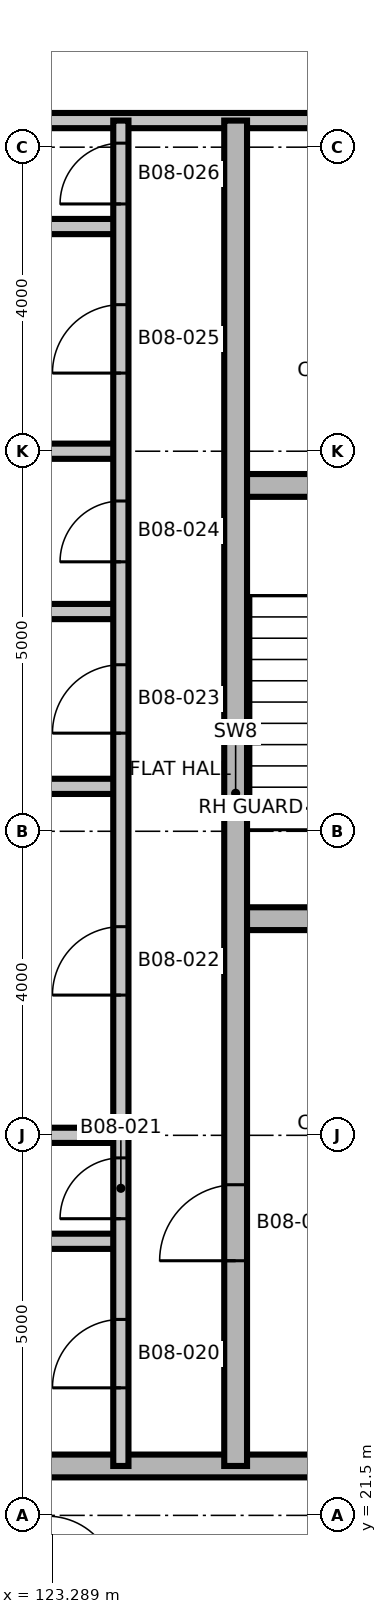
"""IFC4 building model, lengths in metres.
Left out: names, types, materials, properties, quantities, classifications, styles, units other than length and angle.
Written with IfcOpenShell. Run it as: python <this file> out.ifc"""

import sys

from ifc_helpers import new_model, si_unit, direction, frame, frame_2d, origin, place, context, subcontext, project, spatial, rectangle, extrude, element, fill, save


model = new_model("IFC4")
c1 = context("Model", 3, precision=1e-05, world=origin(), true_north=direction((0.0, 1.0)))
c2 = subcontext(c1, "Body", "Model", "MODEL_VIEW")
j1 = project(units=[si_unit("LENGTHUNIT", "METRE"), si_unit("PLANEANGLEUNIT", "RADIAN")], contexts=[c1])
p1 = place(None, origin())
s1 = spatial("IfcSite", under=j1, at=p1, CompositionType="ELEMENT")
p2 = place(p1, origin())
s2 = spatial("IfcBuilding", under=s1, at=p2, CompositionType="ELEMENT")
p3 = place(p2, frame((0.0, 0.0, 94.5)))
s3 = spatial("IfcBuildingStorey", under=s2, at=p3, CompositionType="ELEMENT", Elevation=94.5)
p4 = place(p3, frame((120.56, 22.15, 0.0), z_axis=(0.0, 0.0, 1.0), x_axis=(1.0, 0.0, 0.0)))
e1 = element("IfcWall", 1, at=p4, inside=s3, PredefinedType="SHEAR", context=c2, shape_type="SweptSolid", body=[
    extrude(rectangle(XDim=24.38, YDim=0.3, at=frame_2d((12.19, 0.0))), origin(), (0.0, 0.0, 1.0), 3.4),
])
p5 = place(p4, frame((22.19, 0.0, 0.0)))
e2 = element("IfcOpeningElement", 2, at=p5, cuts=e1, PredefinedType="OPENING", context=c2, shape_type="SweptSolid", body=[
    extrude(rectangle(XDim=1.0, YDim=2.1, at=frame_2d((0.5, 1.05))), frame((0.0, 0.16, 0.0), z_axis=(0.0, -1.0, 0.0), x_axis=(1.0, 0.0, 0.0)), (0.0, 0.0, 1.0), 0.32),
])
p6 = place(p4, frame((10.54, 0.0, 0.0)))
e3 = element("IfcOpeningElement", 3, at=p6, cuts=e1, PredefinedType="OPENING", context=c2, shape_type="SweptSolid", body=[
    extrude(rectangle(XDim=1.0, YDim=2.1, at=frame_2d((0.5, 1.05))), frame((0.0, 0.16, 0.0), z_axis=(0.0, -1.0, 0.0), x_axis=(1.0, 0.0, 0.0)), (0.0, 0.0, 1.0), 0.32),
])
p7 = place(p4, frame((16.19, 0.0, 0.0)))
e4 = element("IfcOpeningElement", 4, at=p7, cuts=e1, PredefinedType="OPENING", context=c2, shape_type="SweptSolid", body=[
    extrude(rectangle(XDim=0.9, YDim=2.1, at=frame_2d((0.45, 1.05))), frame((0.0, 0.16, 0.0), z_axis=(0.0, -1.0, 0.0), x_axis=(1.0, 0.0, 0.0)), (0.0, 0.0, 1.0), 0.32),
])
for number, where, z_axis, x_axis in (
    (5, (120.56, 25.106, 0.0), (0.0, 0.0, 1.0), (1.0, 0.0, 0.0)),
    (6, (120.56, 26.5, 0.0), (0.0, 0.0, 1.0), (1.0, 0.0, 0.0)),
):
    element("IfcWall", number, at=place(p3, frame(where, z_axis=z_axis, x_axis=x_axis)), inside=s3, PredefinedType="PARTITIONING", context=c2, shape_type="SweptSolid", body=[
        extrude(rectangle(XDim=3.63, YDim=0.2, at=frame_2d((1.815, 0.0))), origin(), (0.0, 0.0, 1.0), 3.4),
    ])
p8 = place(p3, frame((125.7, 29.35, 0.0), z_axis=(0.0, 0.0, 1.0), x_axis=(1.0, 0.0, 0.0)))
e7 = element("IfcWall", 7, at=p8, inside=s3, PredefinedType="SHEAR", context=c2, shape_type="SweptSolid", body=[
    extrude(rectangle(XDim=2.83, YDim=0.3, at=frame_2d((1.415, 0.0))), origin(), (0.0, 0.0, 1.0), 3.4),
])
p9 = place(p8, frame((0.975, 0.0, 0.0)))
e8 = element("IfcOpeningElement", 8, at=p9, cuts=e7, PredefinedType="OPENING", context=c2, shape_type="SweptSolid", body=[
    extrude(rectangle(XDim=1.2, YDim=2.1, at=frame_2d((0.6, 1.05))), frame((0.0, 0.16, 0.0), z_axis=(0.0, -1.0, 0.0), x_axis=(1.0, 0.0, 0.0)), (0.0, 0.0, 1.0), 0.32),
])
for number, where, z_axis, x_axis in (
    (9, (120.56, 31.091, 0.0), (0.0, 0.0, 1.0), (1.0, 0.0, 0.0)),
    (10, (120.56, 33.391, 0.0), (0.0, 0.0, 1.0), (1.0, 0.0, 0.0)),
):
    element("IfcWall", number, at=place(p3, frame(where, z_axis=z_axis, x_axis=x_axis)), inside=s3, PredefinedType="PARTITIONING", context=c2, shape_type="SweptSolid", body=[
        extrude(rectangle(XDim=3.63, YDim=0.2, at=frame_2d((1.815, 0.0))), origin(), (0.0, 0.0, 1.0), 3.4),
    ])
p10 = place(p3, frame((125.7, 35.05, 0.0), z_axis=(0.0, 0.0, 1.0), x_axis=(1.0, 0.0, 0.0)))
e11 = element("IfcWall", 11, at=p10, inside=s3, PredefinedType="SHEAR", context=c2, shape_type="SweptSolid", body=[
    extrude(rectangle(XDim=2.83, YDim=0.3, at=frame_2d((1.415, 0.0))), origin(), (0.0, 0.0, 1.0), 3.4),
])
for number, where, z_axis, x_axis in (
    (12, (120.56, 35.5, 0.0), (0.0, 0.0, 1.0), (1.0, 0.0, 0.0)),
    (13, (120.56, 38.456, 0.0), (0.0, 0.0, 1.0), (1.0, 0.0, 0.0)),
):
    element("IfcWall", number, at=place(p3, frame(where, z_axis=z_axis, x_axis=x_axis)), inside=s3, PredefinedType="PARTITIONING", context=c2, shape_type="SweptSolid", body=[
        extrude(rectangle(XDim=3.63, YDim=0.2, at=frame_2d((1.815, 0.0))), origin(), (0.0, 0.0, 1.0), 3.4),
    ])
p11 = place(p3, frame((120.56, 39.85, 0.0), z_axis=(0.0, 0.0, 1.0), x_axis=(1.0, 0.0, 0.0)))
e14 = element("IfcWall", 14, at=p11, inside=s3, PredefinedType="PARTITIONING", context=c2, shape_type="SweptSolid", body=[
    extrude(rectangle(XDim=24.38, YDim=0.2, at=frame_2d((12.19, 0.0))), origin(), (0.0, 0.0, 1.0), 3.4),
])
p12 = place(p11, frame((10.54, 0.0, 0.0)))
e15 = element("IfcOpeningElement", 15, at=p12, cuts=e14, PredefinedType="OPENING", context=c2, shape_type="SweptSolid", body=[
    extrude(rectangle(XDim=1.0, YDim=2.1, at=frame_2d((0.5, 1.05))), frame((0.0, 0.11, 0.0), z_axis=(0.0, -1.0, 0.0), x_axis=(1.0, 0.0, 0.0)), (0.0, 0.0, 1.0), 0.22),
])
p13 = place(p11, frame((16.09, 0.0, 0.0)))
e16 = element("IfcOpeningElement", 16, at=p13, cuts=e14, PredefinedType="OPENING", context=c2, shape_type="SweptSolid", body=[
    extrude(rectangle(XDim=1.8, YDim=2.1, at=frame_2d((0.9, 1.05))), frame((0.0, 0.11, 0.0), z_axis=(0.0, -1.0, 0.0), x_axis=(1.0, 0.0, 0.0)), (0.0, 0.0, 1.0), 0.22),
])
p14 = place(p3, frame((124.19, 22.15, 0.0), z_axis=(0.0, 0.0, 1.0), x_axis=(0.0, 1.0, 0.0)))
e17 = element("IfcWall", 17, at=p14, inside=s3, PredefinedType="PARTITIONING", context=c2, shape_type="SweptSolid", body=[
    extrude(rectangle(XDim=17.7, YDim=0.2, at=frame_2d((8.85, 0.0))), origin(), (0.0, 0.0, 1.0), 3.4),
])
p15 = place(p14, frame((1.028, 0.0, 0.0)))
e18 = element("IfcOpeningElement", 18, at=p15, cuts=e17, PredefinedType="OPENING", context=c2, shape_type="SweptSolid", body=[
    extrude(rectangle(XDim=0.9, YDim=2.1, at=frame_2d((0.45, 1.05))), frame((0.0, 0.11, 0.0), z_axis=(0.0, -1.0, 0.0), x_axis=(1.0, 0.0, 0.0)), (0.0, 0.0, 1.0), 0.22),
])
p16 = place(p14, frame((3.253, 0.0, 0.0)))
e19 = element("IfcOpeningElement", 19, at=p16, cuts=e17, PredefinedType="OPENING", context=c2, shape_type="SweptSolid", body=[
    extrude(rectangle(XDim=0.8, YDim=2.1, at=frame_2d((0.4, 1.05))), frame((0.0, 0.11, 0.0), z_axis=(0.0, -1.0, 0.0), x_axis=(1.0, 0.0, 0.0)), (0.0, 0.0, 1.0), 0.22),
])
p17 = place(p14, frame((6.195, 0.0, 0.0)))
e20 = element("IfcOpeningElement", 20, at=p17, cuts=e17, PredefinedType="OPENING", context=c2, shape_type="SweptSolid", body=[
    extrude(rectangle(XDim=0.9, YDim=2.1, at=frame_2d((0.45, 1.05))), frame((0.0, 0.11, 0.0), z_axis=(0.0, -1.0, 0.0), x_axis=(1.0, 0.0, 0.0)), (0.0, 0.0, 1.0), 0.22),
])
p18 = place(p14, frame((9.641, 0.0, 0.0)))
e21 = element("IfcOpeningElement", 21, at=p18, cuts=e17, PredefinedType="OPENING", context=c2, shape_type="SweptSolid", body=[
    extrude(rectangle(XDim=0.9, YDim=2.1, at=frame_2d((0.45, 1.05))), frame((0.0, 0.11, 0.0), z_axis=(0.0, -1.0, 0.0), x_axis=(1.0, 0.0, 0.0)), (0.0, 0.0, 1.0), 0.22),
])
p19 = place(p14, frame((11.895, 0.0, 0.0)))
e22 = element("IfcOpeningElement", 22, at=p19, cuts=e17, PredefinedType="OPENING", context=c2, shape_type="SweptSolid", body=[
    extrude(rectangle(XDim=0.8, YDim=2.1, at=frame_2d((0.4, 1.05))), frame((0.0, 0.11, 0.0), z_axis=(0.0, -1.0, 0.0), x_axis=(1.0, 0.0, 0.0)), (0.0, 0.0, 1.0), 0.22),
])
p20 = place(p14, frame((14.378, 0.0, 0.0)))
e23 = element("IfcOpeningElement", 23, at=p20, cuts=e17, PredefinedType="OPENING", context=c2, shape_type="SweptSolid", body=[
    extrude(rectangle(XDim=0.9, YDim=2.1, at=frame_2d((0.45, 1.05))), frame((0.0, 0.11, 0.0), z_axis=(0.0, -1.0, 0.0), x_axis=(1.0, 0.0, 0.0)), (0.0, 0.0, 1.0), 0.22),
])
p21 = place(p14, frame((16.603, 0.0, 0.0)))
e24 = element("IfcOpeningElement", 24, at=p21, cuts=e17, PredefinedType="OPENING", context=c2, shape_type="SweptSolid", body=[
    extrude(rectangle(XDim=0.8, YDim=2.1, at=frame_2d((0.4, 1.05))), frame((0.0, 0.11, 0.0), z_axis=(0.0, -1.0, 0.0), x_axis=(1.0, 0.0, 0.0)), (0.0, 0.0, 1.0), 0.22),
])
p22 = place(p3, frame((125.7, 22.15, 0.0), z_axis=(0.0, 0.0, 1.0), x_axis=(0.0, 1.0, 0.0)))
e25 = element("IfcWall", 25, at=p22, inside=s3, PredefinedType="SHEAR", context=c2, shape_type="SweptSolid", body=[
    extrude(rectangle(XDim=17.7, YDim=0.3, at=frame_2d((8.85, 0.0))), origin(), (0.0, 0.0, 1.0), 3.4),
])
p23 = place(p22, frame((2.7, 0.0, 0.0)))
e26 = element("IfcOpeningElement", 26, at=p23, cuts=e25, PredefinedType="OPENING", context=c2, shape_type="SweptSolid", body=[
    extrude(rectangle(XDim=1.0, YDim=2.1, at=frame_2d((0.5, 1.05))), frame((0.0, 0.16, 0.0), z_axis=(0.0, -1.0, 0.0), x_axis=(1.0, 0.0, 0.0)), (0.0, 0.0, 1.0), 0.32),
])
p24 = place(p23, origin())
e27 = element("IfcDoor", 27, at=p24, inside=s3, OperationType="SINGLE_SWING_LEFT", PredefinedType="DOOR", context=c2, shape_type="SweptSolid", body=[
    extrude(rectangle(XDim=1.0, YDim=2.1, at=frame_2d((0.5, 1.05))), frame((0.0, 0.025, 0.0), z_axis=(0.0, -1.0, 0.0), x_axis=(1.0, 0.0, 0.0)), (0.0, 0.0, 1.0), 0.05),
])
fill(e26, e27)
p25 = place(p15, origin())
e28 = element("IfcDoor", 28, at=p25, inside=s3, OperationType="SINGLE_SWING_RIGHT", PredefinedType="DOOR", context=c2, shape_type="SweptSolid", body=[
    extrude(rectangle(XDim=0.9, YDim=2.1, at=frame_2d((0.45, 1.05))), frame((0.0, 0.025, 0.0), z_axis=(0.0, -1.0, 0.0), x_axis=(1.0, 0.0, 0.0)), (0.0, 0.0, 1.0), 0.05),
])
fill(e18, e28)
p26 = place(p16, origin())
e29 = element("IfcDoor", 29, at=p26, inside=s3, OperationType="SINGLE_SWING_LEFT", PredefinedType="DOOR", context=c2, shape_type="SweptSolid", body=[
    extrude(rectangle(XDim=0.8, YDim=2.1, at=frame_2d((0.4, 1.05))), frame((0.0, 0.025, 0.0), z_axis=(0.0, -1.0, 0.0), x_axis=(1.0, 0.0, 0.0)), (0.0, 0.0, 1.0), 0.05),
])
fill(e19, e29)
p27 = place(p17, origin())
e30 = element("IfcDoor", 30, at=p27, inside=s3, OperationType="SINGLE_SWING_RIGHT", PredefinedType="DOOR", context=c2, shape_type="SweptSolid", body=[
    extrude(rectangle(XDim=0.9, YDim=2.1, at=frame_2d((0.45, 1.05))), frame((0.0, 0.025, 0.0), z_axis=(0.0, -1.0, 0.0), x_axis=(1.0, 0.0, 0.0)), (0.0, 0.0, 1.0), 0.05),
])
fill(e20, e30)
p28 = place(p18, origin())
e31 = element("IfcDoor", 31, at=p28, inside=s3, OperationType="SINGLE_SWING_LEFT", PredefinedType="DOOR", context=c2, shape_type="SweptSolid", body=[
    extrude(rectangle(XDim=0.9, YDim=2.1, at=frame_2d((0.45, 1.05))), frame((0.0, 0.025, 0.0), z_axis=(0.0, -1.0, 0.0), x_axis=(1.0, 0.0, 0.0)), (0.0, 0.0, 1.0), 0.05),
])
fill(e21, e31)
p29 = place(p19, origin())
e32 = element("IfcDoor", 32, at=p29, inside=s3, OperationType="SINGLE_SWING_RIGHT", PredefinedType="DOOR", context=c2, shape_type="SweptSolid", body=[
    extrude(rectangle(XDim=0.8, YDim=2.1, at=frame_2d((0.4, 1.05))), frame((0.0, 0.025, 0.0), z_axis=(0.0, -1.0, 0.0), x_axis=(1.0, 0.0, 0.0)), (0.0, 0.0, 1.0), 0.05),
])
fill(e22, e32)
p30 = place(p20, origin())
e33 = element("IfcDoor", 33, at=p30, inside=s3, OperationType="SINGLE_SWING_LEFT", PredefinedType="DOOR", context=c2, shape_type="SweptSolid", body=[
    extrude(rectangle(XDim=0.9, YDim=2.1, at=frame_2d((0.45, 1.05))), frame((0.0, 0.025, 0.0), z_axis=(0.0, -1.0, 0.0), x_axis=(1.0, 0.0, 0.0)), (0.0, 0.0, 1.0), 0.05),
])
fill(e23, e33)
p31 = place(p21, origin())
e34 = element("IfcDoor", 34, at=p31, inside=s3, OperationType="SINGLE_SWING_RIGHT", PredefinedType="DOOR", context=c2, shape_type="SweptSolid", body=[
    extrude(rectangle(XDim=0.8, YDim=2.1, at=frame_2d((0.4, 1.05))), frame((0.0, 0.025, 0.0), z_axis=(0.0, -1.0, 0.0), x_axis=(1.0, 0.0, 0.0)), (0.0, 0.0, 1.0), 0.05),
])
fill(e24, e34)
save(model, sys.argv[1])
